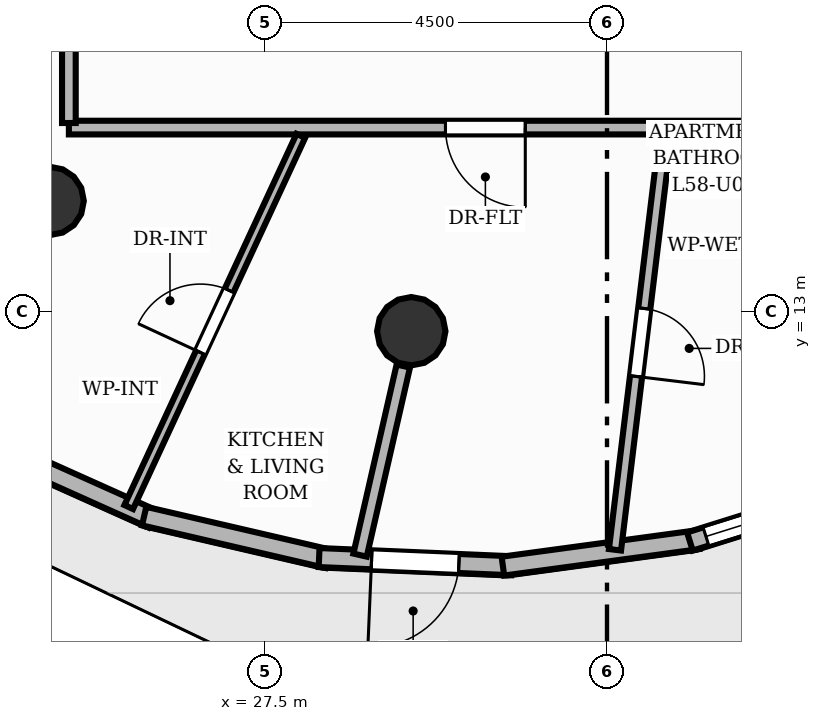
"""IFC4 building model, lengths in metres.
Left out: names, types, materials, properties, quantities, classifications, styles, units other than length and angle.
Written with IfcOpenShell. Run it as: python <this file> out.ifc"""

import sys

from ifc_helpers import new_model, si_unit, direction, frame, frame_2d, origin, origin_2d, place, context, subcontext, project, spatial, rectangle, circle, extrude, element, fill, save


model = new_model("IFC4")
c1 = context("Model", 3, precision=1e-05, world=origin(), true_north=direction((0.0, 1.0)))
c2 = subcontext(c1, "Body", "Model", "MODEL_VIEW")
j1 = project(units=[si_unit("LENGTHUNIT", "METRE"), si_unit("PLANEANGLEUNIT", "RADIAN")], contexts=[c1])
p1 = place(None, origin())
s1 = spatial("IfcSite", under=j1, at=p1, CompositionType="ELEMENT")
p2 = place(p1, origin())
s2 = spatial("IfcBuilding", under=s1, at=p2, CompositionType="ELEMENT")
p3 = place(p2, frame((0.0, 0.0, 195.04)))
s3 = spatial("IfcBuildingStorey", under=s2, at=p3, CompositionType="ELEMENT", Elevation=195.04)
for number, where, z_axis, x_axis in (
    (1, (24.667, 14.455, 0.0), (0.0, 0.0, 1.0), (1.0, 0.0, 0.0)),
    (2, (29.425, 12.74, 0.0), (0.0, 0.0, 1.0), (1.0, 0.0, 0.0)),
):
    element("IfcColumn", number, at=place(p3, frame(where, z_axis=z_axis, x_axis=x_axis)), inside=s3, PredefinedType="COLUMN", context=c2, shape_type="SweptSolid", body=[
        extrude(circle(Radius=0.45, at=origin_2d()), origin(), (0.0, 0.0, 1.0), 3.2),
    ])
p4 = place(p3, frame((26.018, 10.271, 0.0), z_axis=(0.0, 0.0, 1.0), x_axis=(-0.912451283158, 0.409185356365, 0.0)))
e3 = element("IfcWall", 3, at=p4, inside=s3, PredefinedType="SOLIDWALL", context=c2, shape_type="SweptSolid", body=[
    extrude(rectangle(XDim=2.437, YDim=0.25, at=frame_2d((1.218, 0.0))), origin(), (0.0, 0.0, 1.0), 2.96),
])
p5 = place(p3, frame((28.324, 9.747, 0.0), z_axis=(0.0, 0.0, 1.0), x_axis=(-0.974096425092, 0.226133046286, 0.0)))
e4 = element("IfcWall", 4, at=p5, inside=s3, PredefinedType="SOLIDWALL", context=c2, shape_type="SweptSolid", body=[
    extrude(rectangle(XDim=2.478, YDim=0.25, at=frame_2d((1.239, 0.0))), origin(), (0.0, 0.0, 1.0), 2.96),
])
p6 = place(p3, frame((30.742, 9.655, 0.0), z_axis=(0.0, 0.0, 1.0), x_axis=(-0.999099670747, 0.042424614469, 0.0)))
e5 = element("IfcWall", 5, at=p6, inside=s3, PredefinedType="SOLIDWALL", context=c2, shape_type="SweptSolid", body=[
    extrude(rectangle(XDim=2.532, YDim=0.25, at=frame_2d((1.266, 0.0))), origin(), (0.0, 0.0, 1.0), 2.96),
])
p7 = place(p6, frame((0.691, 0.0, 0.0)))
e6 = element("IfcOpeningElement", 6, at=p7, cuts=e5, PredefinedType="OPENING", context=c2, shape_type="SweptSolid", body=[
    extrude(rectangle(XDim=1.15, YDim=2.2, at=frame_2d((0.575, 1.1))), frame((0.0, 0.135, 0.0), z_axis=(0.0, -1.0, 0.0), x_axis=(1.0, 0.0, 0.0)), (0.0, 0.0, 1.0), 0.27),
])
p8 = place(p3, frame((33.199, 9.998, 0.0), z_axis=(0.0, 0.0, 1.0), x_axis=(-0.990951844978, -0.134217886046, 0.0)))
e7 = element("IfcWall", 7, at=p8, inside=s3, PredefinedType="SOLIDWALL", context=c2, shape_type="SweptSolid", body=[
    extrude(rectangle(XDim=2.592, YDim=0.25, at=frame_2d((1.296, 0.0))), origin(), (0.0, 0.0, 1.0), 2.96),
])
p9 = place(p3, frame((35.621, 10.766, 0.0), z_axis=(0.0, 0.0, 1.0), x_axis=(-0.954307768746, -0.298825505122, 0.0)))
e8 = element("IfcWall", 8, at=p9, inside=s3, PredefinedType="SOLIDWALL", context=c2, shape_type="SweptSolid", body=[
    extrude(rectangle(XDim=2.651, YDim=0.25, at=frame_2d((1.326, 0.0))), origin(), (0.0, 0.0, 1.0), 2.96),
])
p10 = place(p9, frame((0.78, 0.0, 0.85)))
e9 = element("IfcOpeningElement", 9, at=p10, cuts=e8, PredefinedType="OPENING", context=c2, shape_type="SweptSolid", body=[
    extrude(rectangle(XDim=1.65, YDim=1.52, at=frame_2d((0.825, 0.76))), frame((0.0, 0.135, 0.0), z_axis=(0.0, -1.0, 0.0), x_axis=(1.0, 0.0, 0.0)), (0.0, 0.0, 1.0), 0.27),
])
p11 = place(p3, frame((29.32, 12.282, 0.0), z_axis=(0.0, 0.0, 1.0), x_axis=(-0.22299363946, -0.974819899654, 0.0)))
e10 = element("IfcWall", 10, at=p11, inside=s3, PredefinedType="PARTITIONING", context=c2, shape_type="SweptSolid", body=[
    extrude(rectangle(XDim=2.552, YDim=0.18, at=frame_2d((1.276, 0.0))), origin(), (0.0, 0.0, 1.0), 2.403),
])
p12 = place(p3, frame((39.08, 15.42, 0.0), z_axis=(0.0, 0.0, 1.0), x_axis=(-1.0, 0.0, 0.0)))
e11 = element("IfcWall", 11, at=p12, inside=s3, PredefinedType="PARTITIONING", context=c2, shape_type="SweptSolid", body=[
    extrude(rectangle(XDim=14.16, YDim=0.18, at=frame_2d((7.08, 0.0))), origin(), (0.0, 0.0, 1.0), 2.955),
])
p13 = place(p12, frame((8.155, 0.0, 0.0)))
e12 = element("IfcOpeningElement", 12, at=p13, cuts=e11, PredefinedType="OPENING", context=c2, shape_type="SweptSolid", body=[
    extrude(rectangle(XDim=1.05, YDim=2.15, at=frame_2d((0.525, 1.075))), frame((0.0, 0.1, 0.0), z_axis=(0.0, -1.0, 0.0), x_axis=(1.0, 0.0, 0.0)), (0.0, 0.0, 1.0), 0.2),
])
p14 = place(p3, frame((24.92, 15.48, 0.0), z_axis=(0.0, 0.0, 1.0), x_axis=(0.0, 1.0, 0.0)))
e13 = element("IfcWall", 13, at=p14, inside=s3, PredefinedType="PARTITIONING", context=c2, shape_type="SweptSolid", body=[
    extrude(rectangle(XDim=5.1, YDim=0.18, at=frame_2d((2.55, 0.0))), origin(), (0.0, 0.0, 1.0), 2.955),
])
p15 = place(p3, frame((32.768, 15.321, 0.0), z_axis=(0.0, 0.0, 1.0), x_axis=(-0.120556883214, -0.992706420806, 0.0)))
e14 = element("IfcWall", 14, at=p15, inside=s3, PredefinedType="PLUMBINGWALL", context=c2, shape_type="SweptSolid", body=[
    extrude(rectangle(XDim=5.496, YDim=0.16, at=frame_2d((2.748, 0.0))), origin(), (0.0, 0.0, 1.0), 2.692),
])
p16 = place(p15, frame((2.298, 0.0, 0.0)))
e15 = element("IfcOpeningElement", 15, at=p16, cuts=e14, PredefinedType="OPENING", context=c2, shape_type="SweptSolid", body=[
    extrude(rectangle(XDim=0.9, YDim=2.1, at=frame_2d((0.45, 1.05))), frame((0.0, 0.09, 0.0), z_axis=(0.0, -1.0, 0.0), x_axis=(1.0, 0.0, 0.0)), (0.0, 0.0, 1.0), 0.18),
])
p17 = place(p3, frame((25.708, 10.427, 0.0), z_axis=(0.0, 0.0, 1.0), x_axis=(0.420587579127, 0.907251943114, 0.0)))
e16 = element("IfcWall", 16, at=p17, inside=s3, PredefinedType="PARTITIONING", context=c2, shape_type="SweptSolid", body=[
    extrude(rectangle(XDim=5.383, YDim=0.125, at=frame_2d((2.692, 0.0))), origin(), (0.0, 0.0, 1.0), 2.955),
])
p18 = place(p17, frame((2.242, 0.0, 0.0)))
e17 = element("IfcOpeningElement", 17, at=p18, cuts=e16, PredefinedType="OPENING", context=c2, shape_type="SweptSolid", body=[
    extrude(rectangle(XDim=0.9, YDim=2.1, at=frame_2d((0.45, 1.05))), frame((0.0, 0.073, 0.0), z_axis=(0.0, -1.0, 0.0), x_axis=(1.0, 0.0, 0.0)), (0.0, 0.0, 1.0), 0.145),
])
p19 = place(p7, origin())
e18 = element("IfcDoor", 18, at=p19, inside=s3, OperationType="SINGLE_SWING_RIGHT", PredefinedType="DOOR", context=c2, shape_type="SweptSolid", body=[
    extrude(rectangle(XDim=1.15, YDim=2.2, at=frame_2d((0.575, 1.1))), frame((0.0, 0.025, 0.0), z_axis=(0.0, -1.0, 0.0), x_axis=(1.0, 0.0, 0.0)), (0.0, 0.0, 1.0), 0.05),
])
fill(e6, e18)
p20 = place(p10, origin())
e19 = element("IfcWindow", 19, at=p20, inside=s3, PartitioningType="SINGLE_PANEL", PredefinedType="WINDOW", context=c2, shape_type="SweptSolid", body=[
    extrude(rectangle(XDim=1.65, YDim=1.52, at=frame_2d((0.825, 0.76))), frame((0.0, 0.03, 0.0), z_axis=(0.0, -1.0, 0.0), x_axis=(1.0, 0.0, 0.0)), (0.0, 0.0, 1.0), 0.06),
])
fill(e9, e19)
p21 = place(p13, origin())
e20 = element("IfcDoor", 20, at=p21, inside=s3, OperationType="SINGLE_SWING_LEFT", PredefinedType="DOOR", context=c2, shape_type="SweptSolid", body=[
    extrude(rectangle(XDim=1.05, YDim=2.15, at=frame_2d((0.525, 1.075))), frame((0.0, 0.025, 0.0), z_axis=(0.0, -1.0, 0.0), x_axis=(1.0, 0.0, 0.0)), (0.0, 0.0, 1.0), 0.05),
])
fill(e12, e20)
p22 = place(p16, origin())
e21 = element("IfcDoor", 21, at=p22, inside=s3, OperationType="SINGLE_SWING_RIGHT", PredefinedType="DOOR", context=c2, shape_type="SweptSolid", body=[
    extrude(rectangle(XDim=0.9, YDim=2.1, at=frame_2d((0.45, 1.05))), frame((0.0, 0.025, 0.0), z_axis=(0.0, -1.0, 0.0), x_axis=(1.0, 0.0, 0.0)), (0.0, 0.0, 1.0), 0.05),
])
fill(e15, e21)
p23 = place(p18, origin())
e22 = element("IfcDoor", 22, at=p23, inside=s3, OperationType="SINGLE_SWING_LEFT", PredefinedType="DOOR", context=c2, shape_type="SweptSolid", body=[
    extrude(rectangle(XDim=0.9, YDim=2.1, at=frame_2d((0.45, 1.05))), frame((0.0, 0.025, 0.0), z_axis=(0.0, -1.0, 0.0), x_axis=(1.0, 0.0, 0.0)), (0.0, 0.0, 1.0), 0.05),
])
fill(e17, e22)
save(model, sys.argv[1])
